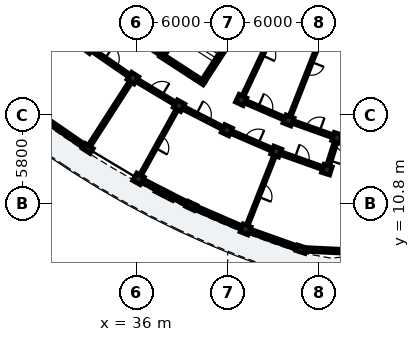
"""IFC4 building model, lengths in metres.
Left out: names, types, materials, properties, quantities, classifications, styles, units other than length and angle.
Written with IfcOpenShell. Run it as: python <this file> out.ifc"""

import sys

from ifc_helpers import new_model, si_unit, direction, frame, frame_2d, origin, origin_2d, place, context, subcontext, project, spatial, rectangle, extrude, element, fill, save


model = new_model("IFC4")
c1 = context("Model", 3, precision=1e-05, world=origin(), true_north=direction((0.0, 1.0)))
c2 = subcontext(c1, "Body", "Model", "MODEL_VIEW")
j1 = project(units=[si_unit("LENGTHUNIT", "METRE"), si_unit("PLANEANGLEUNIT", "RADIAN")], contexts=[c1])
p1 = place(None, origin())
s1 = spatial("IfcSite", under=j1, at=p1, CompositionType="ELEMENT")
p2 = place(p1, origin())
s2 = spatial("IfcBuilding", under=s1, at=p2, CompositionType="ELEMENT")
p3 = place(p2, frame((0.0, 0.0, 22.28)))
s3 = spatial("IfcBuildingStorey", under=s2, at=p3, CompositionType="ELEMENT", Elevation=22.28)
p4 = place(p3, frame((40.413, 18.882, 0.0), z_axis=(0.0, 0.0, 1.0), x_axis=(0.544629435258, 0.838676802022, 0.0)))
e1 = element("IfcWall", 1, at=p4, inside=s3, PredefinedType="SHEAR", context=c2, shape_type="SweptSolid", body=[
    extrude(rectangle(XDim=6.6, YDim=0.25, at=frame_2d((3.3, 0.0))), origin(), (0.0, 0.0, 1.0), 3.11),
])
p5 = place(p3, frame((40.449, 18.709, 0.0), z_axis=(0.0, 0.0, 1.0), x_axis=(-0.838678407117, 0.544626963559, 0.0)))
e2 = element("IfcWall", 2, at=p5, inside=s3, PredefinedType="SHEAR", context=c2, shape_type="SweptSolid", body=[
    extrude(rectangle(XDim=3.42, YDim=0.25, at=frame_2d((1.71, 0.0))), origin(), (0.0, 0.0, 1.0), 3.11),
])
p6 = place(p3, frame((37.754, 20.608, 0.0), z_axis=(0.0, 0.0, 1.0), x_axis=(0.544655453679, 0.838659905312, 0.0)))
e3 = element("IfcWall", 3, at=p6, inside=s3, PredefinedType="SHEAR", context=c2, shape_type="SweptSolid", body=[
    extrude(rectangle(XDim=6.6, YDim=0.25, at=frame_2d((3.3, 0.0))), origin(), (0.0, 0.0, 1.0), 3.11),
])
p7 = place(p6, frame((0.22, 0.0, 0.0)))
e4 = element("IfcOpeningElement", 4, at=p7, cuts=e3, PredefinedType="OPENING", context=c2, shape_type="SweptSolid", body=[
    extrude(rectangle(XDim=1.05, YDim=2.15, at=frame_2d((0.525, 1.075))), frame((0.0, 0.135, 0.0), z_axis=(0.0, -1.0, 0.0), x_axis=(1.0, 0.0, 0.0)), (0.0, 0.0, 1.0), 0.27),
])
for number, where, z_axis, x_axis in (
    (5, (32.85, 21.052, 0.0), (0.0, 0.0, 1.0), (-0.595, -0.804, 0.0)),
    (6, (35.76, 19.042, 0.0), (0.0, 0.0, 1.0), (-0.541, -0.841, 0.0)),
):
    element("IfcColumn", number, at=place(p3, frame(where, z_axis=z_axis, x_axis=x_axis)), inside=s3, PredefinedType="COLUMN", context=c2, shape_type="SweptSolid", body=[
        extrude(rectangle(XDim=0.56, YDim=0.56, at=origin_2d()), origin(), (0.0, 0.0, 1.0), 3.11),
    ])
p8 = place(p3, frame((32.785, 14.416, 0.0), z_axis=(0.0, 0.0, 1.0), x_axis=(-0.540974471368, -0.841039012964, 0.0)))
e7 = element("IfcColumn", 7, at=p8, inside=s3, PredefinedType="PILASTER", context=c2, shape_type="SweptSolid", body=[
    extrude(rectangle(XDim=0.38, YDim=0.62, at=origin_2d()), origin(), (0.0, 0.0, 1.0), 3.11),
])
for number, where, z_axis, x_axis in (
    (8, (38.796, 17.227, 0.0), (0.0, 0.0, 1.0), (-0.485, -0.875, 0.0)),
    (9, (36.13, 12.417, 0.0), (0.0, 0.0, 1.0), (-0.485, -0.875, 0.0)),
    (10, (42.882, 17.604, 0.0), (0.0, 0.0, 1.0), (-0.427, -0.904, 0.0)),
    (11, (41.944, 15.614, 0.0), (0.0, 0.0, 1.0), (-0.427, -0.904, 0.0)),
):
    element("IfcColumn", number, at=place(p3, frame(where, z_axis=z_axis, x_axis=x_axis)), inside=s3, PredefinedType="COLUMN", context=c2, shape_type="SweptSolid", body=[
        extrude(rectangle(XDim=0.56, YDim=0.56, at=origin_2d()), origin(), (0.0, 0.0, 1.0), 3.11),
    ])
p9 = place(p3, frame((39.598, 10.64, 0.0), z_axis=(0.0, 0.0, 1.0), x_axis=(-0.426568739901, -0.904455145454, 0.0)))
e12 = element("IfcColumn", 12, at=p9, inside=s3, PredefinedType="PILASTER", context=c2, shape_type="SweptSolid", body=[
    extrude(rectangle(XDim=0.38, YDim=0.62, at=origin_2d()), origin(), (0.0, 0.0, 1.0), 3.11),
])
for number, where, z_axis, x_axis in (
    (13, (45.997, 16.258, 0.0), (0.0, 0.0, 1.0), (-0.367, -0.93, 0.0)),
    (14, (45.191, 14.211, 0.0), (0.0, 0.0, 1.0), (-0.367, -0.93, 0.0)),
    (15, (43.175, 9.094, 0.0), (0.0, 0.0, 1.0), (-0.367, -0.93, 0.0)),
    (16, (49.193, 15.118, 0.0), (0.0, 0.0, 1.0), (-0.305, -0.952, 0.0)),
    (17, (48.522, 13.023, 0.0), (0.0, 0.0, 1.0), (-0.305, -0.952, 0.0)),
):
    element("IfcColumn", number, at=place(p3, frame(where, z_axis=z_axis, x_axis=x_axis)), inside=s3, PredefinedType="COLUMN", context=c2, shape_type="SweptSolid", body=[
        extrude(rectangle(XDim=0.56, YDim=0.56, at=origin_2d()), origin(), (0.0, 0.0, 1.0), 3.11),
    ])
p10 = place(p3, frame((46.845, 7.785, 0.0), z_axis=(0.0, 0.0, 1.0), x_axis=(-0.304864299028, -0.952395799643, 0.0)))
e18 = element("IfcColumn", 18, at=p10, inside=s3, PredefinedType="PILASTER", context=c2, shape_type="SweptSolid", body=[
    extrude(rectangle(XDim=0.38, YDim=0.62, at=origin_2d()), origin(), (0.0, 0.0, 1.0), 3.11),
])
p11 = place(p3, frame((29.784, 16.488, 0.0), z_axis=(0.0, 0.0, 1.0), x_axis=(0.822902356734, -0.568182815017, 0.0)))
e19 = element("IfcWall", 19, at=p11, inside=s3, PredefinedType="SOLIDWALL", context=c2, shape_type="SweptSolid", body=[
    extrude(rectangle(XDim=3.487, YDim=0.245, at=frame_2d((1.743, 0.0))), origin(), (0.0, 0.0, 1.0), 2.355),
])
p12 = place(p11, frame((0.918, 0.0, 0.35)))
e20 = element("IfcOpeningElement", 20, at=p12, cuts=e19, PredefinedType="OPENING", context=c2, shape_type="SweptSolid", body=[
    extrude(rectangle(XDim=1.65, YDim=1.8, at=frame_2d((0.825, 0.9))), frame((0.0, 0.133, 0.0), z_axis=(0.0, -1.0, 0.0), x_axis=(1.0, 0.0, 0.0)), (0.0, 0.0, 1.0), 0.265),
])
p13 = place(p3, frame((36.352, 12.302, 0.0), z_axis=(0.0, 0.0, 1.0), x_axis=(0.890001092753, -0.45595839163, 0.0)))
e21 = element("IfcWall", 21, at=p13, inside=s3, PredefinedType="SOLIDWALL", context=c2, shape_type="SweptSolid", body=[
    extrude(rectangle(XDim=3.487, YDim=0.245, at=frame_2d((1.743, 0.0))), origin(), (0.0, 0.0, 1.0), 2.355),
])
p14 = place(p13, frame((1.104, 0.0, 0.55)))
e22 = element("IfcOpeningElement", 22, at=p14, cuts=e21, PredefinedType="OPENING", context=c2, shape_type="SweptSolid", body=[
    extrude(rectangle(XDim=1.28, YDim=1.52, at=frame_2d((0.64, 0.76))), frame((0.0, 0.133, 0.0), z_axis=(0.0, -1.0, 0.0), x_axis=(1.0, 0.0, 0.0)), (0.0, 0.0, 1.0), 0.265),
])
p15 = place(p3, frame((39.745, 10.576, 0.0), z_axis=(0.0, 0.0, 1.0), x_axis=(0.917938367037, -0.396723019652, 0.0)))
e23 = element("IfcWall", 23, at=p15, inside=s3, PredefinedType="SOLIDWALL", context=c2, shape_type="SweptSolid", body=[
    extrude(rectangle(XDim=3.487, YDim=0.245, at=frame_2d((1.743, 0.0))), origin(), (0.0, 0.0, 1.0), 2.355),
])
p16 = place(p15, frame((0.953, 0.0, 0.35)))
e24 = element("IfcOpeningElement", 24, at=p16, cuts=e23, PredefinedType="OPENING", context=c2, shape_type="SweptSolid", body=[
    extrude(rectangle(XDim=1.58, YDim=1.68, at=frame_2d((0.79, 0.84))), frame((0.0, 0.133, 0.0), z_axis=(0.0, -1.0, 0.0), x_axis=(1.0, 0.0, 0.0)), (0.0, 0.0, 1.0), 0.265),
])
p17 = place(p3, frame((43.41, 9.01, 0.0), z_axis=(0.0, 0.0, 1.0), x_axis=(0.941903386561, -0.335883923976, 0.0)))
e25 = element("IfcWall", 25, at=p17, inside=s3, PredefinedType="SOLIDWALL", context=c2, shape_type="SweptSolid", body=[
    extrude(rectangle(XDim=3.487, YDim=0.245, at=frame_2d((1.743, 0.0))), origin(), (0.0, 0.0, 1.0), 2.355),
])
p18 = place(p17, frame((1.123, 0.0, 0.55)))
e26 = element("IfcOpeningElement", 26, at=p18, cuts=e25, PredefinedType="OPENING", context=c2, shape_type="SweptSolid", body=[
    extrude(rectangle(XDim=1.24, YDim=1.535, at=frame_2d((0.62, 0.768))), frame((0.0, 0.133, 0.0), z_axis=(0.0, -1.0, 0.0), x_axis=(1.0, 0.0, 0.0)), (0.0, 0.0, 1.0), 0.265),
])
p19 = place(p3, frame((50.749, 7.597, 0.0), z_axis=(0.0, 0.0, 1.0), x_axis=(-0.998848550461, 0.047974714619, 0.0)))
e27 = element("IfcWall", 27, at=p19, inside=s3, PredefinedType="SOLIDWALL", context=c2, shape_type="SweptSolid", body=[
    extrude(rectangle(XDim=3.908, YDim=0.245, at=frame_2d((1.954, 0.0))), origin(), (0.0, 0.0, 1.0), 2.355),
])
p20 = place(p19, frame((0.979, 0.0, 0.4)))
e28 = element("IfcOpeningElement", 28, at=p20, cuts=e27, PredefinedType="OPENING", context=c2, shape_type="SweptSolid", body=[
    extrude(rectangle(XDim=1.95, YDim=1.78, at=frame_2d((0.975, 0.89))), frame((0.0, 0.133, 0.0), z_axis=(0.0, -1.0, 0.0), x_axis=(1.0, 0.0, 0.0)), (0.0, 0.0, 1.0), 0.265),
])
p21 = place(p3, frame((37.639, 20.623, 0.0), z_axis=(0.0, 0.0, 1.0), x_axis=(-0.838681446513, 0.544622283124, 0.0)))
e29 = element("IfcWall", 29, at=p21, inside=s3, PredefinedType="PARTITIONING", context=c2, shape_type="SweptSolid", body=[
    extrude(rectangle(XDim=4.9, YDim=0.22, at=frame_2d((2.45, 0.0))), origin(), (0.0, 0.0, 1.0), 2.34),
])
p22 = place(p21, frame((1.95, 0.0, 0.0)))
e30 = element("IfcOpeningElement", 30, at=p22, cuts=e29, PredefinedType="OPENING", context=c2, shape_type="SweptSolid", body=[
    extrude(rectangle(XDim=0.98, YDim=2.14, at=frame_2d((0.49, 1.07))), frame((0.0, 0.12, 0.0), z_axis=(0.0, -1.0, 0.0), x_axis=(1.0, 0.0, 0.0)), (0.0, 0.0, 1.0), 0.24),
])
p23 = place(p3, frame((33.138, 20.853, 0.0), z_axis=(0.0, 0.0, 1.0), x_axis=(0.822870075235, -0.568229565653, 0.0)))
e31 = element("IfcWall", 31, at=p23, inside=s3, PredefinedType="PARTITIONING", context=c2, shape_type="SweptSolid", body=[
    extrude(rectangle(XDim=2.837, YDim=0.195, at=frame_2d((1.418, 0.0))), origin(), (0.0, 0.0, 1.0), 2.37),
])
p24 = place(p23, frame((0.944, 0.0, 0.0)))
e32 = element("IfcOpeningElement", 32, at=p24, cuts=e31, PredefinedType="OPENING", context=c2, shape_type="SweptSolid", body=[
    extrude(rectangle(XDim=0.95, YDim=2.13, at=frame_2d((0.475, 1.065))), frame((0.0, 0.107, 0.0), z_axis=(0.0, -1.0, 0.0), x_axis=(1.0, 0.0, 0.0)), (0.0, 0.0, 1.0), 0.215),
])
p25 = place(p3, frame((35.544, 18.705, 0.0), z_axis=(0.0, 0.0, 1.0), x_axis=(-0.540959731567, -0.84104849374, 0.0)))
e33 = element("IfcWall", 33, at=p25, inside=s3, PredefinedType="PARTITIONING", context=c2, shape_type="SweptSolid", body=[
    extrude(rectangle(XDim=4.7, YDim=0.175, at=frame_2d((2.35, 0.0))), origin(), (0.0, 0.0, 1.0), 2.37),
])
p26 = place(p3, frame((36.061, 18.862, 0.0), z_axis=(0.0, 0.0, 1.0), x_axis=(0.858281647443, -0.51317892948, 0.0)))
e34 = element("IfcWall", 34, at=p26, inside=s3, PredefinedType="PARTITIONING", context=c2, shape_type="SweptSolid", body=[
    extrude(rectangle(XDim=2.837, YDim=0.195, at=frame_2d((1.418, 0.0))), origin(), (0.0, 0.0, 1.0), 2.37),
])
p27 = place(p26, frame((0.954, 0.0, 0.0)))
e35 = element("IfcOpeningElement", 35, at=p27, cuts=e34, PredefinedType="OPENING", context=c2, shape_type="SweptSolid", body=[
    extrude(rectangle(XDim=0.93, YDim=2.12, at=frame_2d((0.465, 1.06))), frame((0.0, 0.107, 0.0), z_axis=(0.0, -1.0, 0.0), x_axis=(1.0, 0.0, 0.0)), (0.0, 0.0, 1.0), 0.215),
])
p28 = place(p3, frame((38.602, 16.877, 0.0), z_axis=(0.0, 0.0, 1.0), x_axis=(-0.484813534336, -0.874617537513, 0.0)))
e36 = element("IfcWall", 36, at=p28, inside=s3, PredefinedType="PARTITIONING", context=c2, shape_type="SweptSolid", body=[
    extrude(rectangle(XDim=4.7, YDim=0.125, at=frame_2d((2.35, 0.0))), origin(), (0.0, 0.0, 1.0), 2.37),
])
p29 = place(p28, frame((1.915, 0.0, 0.0)))
e37 = element("IfcOpeningElement", 37, at=p29, cuts=e36, PredefinedType="OPENING", context=c2, shape_type="SweptSolid", body=[
    extrude(rectangle(XDim=0.87, YDim=2.08, at=frame_2d((0.435, 1.04))), frame((0.0, 0.073, 0.0), z_axis=(0.0, -1.0, 0.0), x_axis=(1.0, 0.0, 0.0)), (0.0, 0.0, 1.0), 0.145),
])
p30 = place(p3, frame((39.107, 17.067, 0.0), z_axis=(0.0, 0.0, 1.0), x_axis=(0.890030590607, -0.45590080915, 0.0)))
e38 = element("IfcWall", 38, at=p30, inside=s3, PredefinedType="PARTITIONING", context=c2, shape_type="SweptSolid", body=[
    extrude(rectangle(XDim=2.837, YDim=0.195, at=frame_2d((1.418, 0.0))), origin(), (0.0, 0.0, 1.0), 2.37),
])
p31 = place(p30, frame((0.924, 0.0, 0.0)))
e39 = element("IfcOpeningElement", 39, at=p31, cuts=e38, PredefinedType="OPENING", context=c2, shape_type="SweptSolid", body=[
    extrude(rectangle(XDim=0.99, YDim=2.16, at=frame_2d((0.495, 1.08))), frame((0.0, 0.107, 0.0), z_axis=(0.0, -1.0, 0.0), x_axis=(1.0, 0.0, 0.0)), (0.0, 0.0, 1.0), 0.215),
])
p32 = place(p3, frame((45.868, 23.935, 0.0), z_axis=(0.0, 0.0, 1.0), x_axis=(-0.426573573579, -0.904452865728, 0.0)))
e40 = element("IfcWall", 40, at=p32, inside=s3, PredefinedType="PARTITIONING", context=c2, shape_type="SweptSolid", body=[
    extrude(rectangle(XDim=6.6, YDim=0.125, at=frame_2d((3.3, 0.0))), origin(), (0.0, 0.0, 1.0), 2.37),
])
p33 = place(p32, frame((2.855, 0.0, 0.0)))
e41 = element("IfcOpeningElement", 41, at=p33, cuts=e40, PredefinedType="OPENING", context=c2, shape_type="SweptSolid", body=[
    extrude(rectangle(XDim=0.89, YDim=2.1, at=frame_2d((0.445, 1.05))), frame((0.0, 0.073, 0.0), z_axis=(0.0, -1.0, 0.0), x_axis=(1.0, 0.0, 0.0)), (0.0, 0.0, 1.0), 0.145),
])
p34 = place(p3, frame((42.265, 15.475, 0.0), z_axis=(0.0, 0.0, 1.0), x_axis=(0.917943439406, -0.396711282991, 0.0)))
e42 = element("IfcWall", 42, at=p34, inside=s3, PredefinedType="PARTITIONING", context=c2, shape_type="SweptSolid", body=[
    extrude(rectangle(XDim=2.837, YDim=0.195, at=frame_2d((1.418, 0.0))), origin(), (0.0, 0.0, 1.0), 2.37),
])
p35 = place(p34, frame((0.934, 0.0, 0.0)))
e43 = element("IfcOpeningElement", 43, at=p35, cuts=e42, PredefinedType="OPENING", context=c2, shape_type="SweptSolid", body=[
    extrude(rectangle(XDim=0.97, YDim=2.15, at=frame_2d((0.485, 1.075))), frame((0.0, 0.107, 0.0), z_axis=(0.0, -1.0, 0.0), x_axis=(1.0, 0.0, 0.0)), (0.0, 0.0, 1.0), 0.215),
])
p36 = place(p3, frame((43.204, 17.465, 0.0), z_axis=(0.0, 0.0, 1.0), x_axis=(0.91793557165, -0.39672948756, 0.0)))
e44 = element("IfcWall", 44, at=p36, inside=s3, PredefinedType="PARTITIONING", context=c2, shape_type="SweptSolid", body=[
    extrude(rectangle(XDim=2.693, YDim=0.195, at=frame_2d((1.346, 0.0))), origin(), (0.0, 0.0, 1.0), 2.37),
])
p37 = place(p36, frame((0.862, 0.0, 0.0)))
e45 = element("IfcOpeningElement", 45, at=p37, cuts=e44, PredefinedType="OPENING", context=c2, shape_type="SweptSolid", body=[
    extrude(rectangle(XDim=0.97, YDim=2.15, at=frame_2d((0.485, 1.075))), frame((0.0, 0.107, 0.0), z_axis=(0.0, -1.0, 0.0), x_axis=(1.0, 0.0, 0.0)), (0.0, 0.0, 1.0), 0.215),
])
p38 = place(p3, frame((45.044, 13.839, 0.0), z_axis=(0.0, 0.0, 1.0), x_axis=(-0.366468650514, -0.930430399434, 0.0)))
e46 = element("IfcWall", 46, at=p38, inside=s3, PredefinedType="PARTITIONING", context=c2, shape_type="SweptSolid", body=[
    extrude(rectangle(XDim=4.7, YDim=0.125, at=frame_2d((2.35, 0.0))), origin(), (0.0, 0.0, 1.0), 2.37),
])
p39 = place(p38, frame((1.905, 0.0, 0.0)))
e47 = element("IfcOpeningElement", 47, at=p39, cuts=e46, PredefinedType="OPENING", context=c2, shape_type="SweptSolid", body=[
    extrude(rectangle(XDim=0.89, YDim=2.1, at=frame_2d((0.445, 1.05))), frame((0.0, 0.073, 0.0), z_axis=(0.0, -1.0, 0.0), x_axis=(1.0, 0.0, 0.0)), (0.0, 0.0, 1.0), 0.145),
])
p40 = place(p3, frame((48.562, 22.771, 0.0), z_axis=(0.0, 0.0, 1.0), x_axis=(-0.366512873936, -0.930412979939, 0.0)))
e48 = element("IfcWall", 48, at=p40, inside=s3, PredefinedType="PARTITIONING", context=c2, shape_type="SweptSolid", body=[
    extrude(rectangle(XDim=6.6, YDim=0.125, at=frame_2d((3.3, 0.0))), origin(), (0.0, 0.0, 1.0), 2.37),
])
p41 = place(p40, frame((2.865, 0.0, 0.0)))
e49 = element("IfcOpeningElement", 49, at=p41, cuts=e48, PredefinedType="OPENING", context=c2, shape_type="SweptSolid", body=[
    extrude(rectangle(XDim=0.87, YDim=2.08, at=frame_2d((0.435, 1.04))), frame((0.0, 0.073, 0.0), z_axis=(0.0, -1.0, 0.0), x_axis=(1.0, 0.0, 0.0)), (0.0, 0.0, 1.0), 0.145),
])
p42 = place(p3, frame((45.52, 14.093, 0.0), z_axis=(0.0, 0.0, 1.0), x_axis=(0.941930628611, -0.335807520589, 0.0)))
e50 = element("IfcWall", 50, at=p42, inside=s3, PredefinedType="PARTITIONING", context=c2, shape_type="SweptSolid", body=[
    extrude(rectangle(XDim=2.837, YDim=0.195, at=frame_2d((1.418, 0.0))), origin(), (0.0, 0.0, 1.0), 2.37),
])
p43 = place(p42, frame((0.944, 0.0, 0.0)))
e51 = element("IfcOpeningElement", 51, at=p43, cuts=e50, PredefinedType="OPENING", context=c2, shape_type="SweptSolid", body=[
    extrude(rectangle(XDim=0.95, YDim=2.13, at=frame_2d((0.475, 1.065))), frame((0.0, 0.107, 0.0), z_axis=(0.0, -1.0, 0.0), x_axis=(1.0, 0.0, 0.0)), (0.0, 0.0, 1.0), 0.215),
])
p44 = place(p3, frame((46.327, 16.14, 0.0), z_axis=(0.0, 0.0, 1.0), x_axis=(0.941895652647, -0.335905611036, 0.0)))
e52 = element("IfcWall", 52, at=p44, inside=s3, PredefinedType="PARTITIONING", context=c2, shape_type="SweptSolid", body=[
    extrude(rectangle(XDim=2.693, YDim=0.195, at=frame_2d((1.346, 0.0))), origin(), (0.0, 0.0, 1.0), 2.37),
])
p45 = place(p44, frame((0.872, 0.0, 0.0)))
e53 = element("IfcOpeningElement", 53, at=p45, cuts=e52, PredefinedType="OPENING", context=c2, shape_type="SweptSolid", body=[
    extrude(rectangle(XDim=0.95, YDim=2.13, at=frame_2d((0.475, 1.065))), frame((0.0, 0.107, 0.0), z_axis=(0.0, -1.0, 0.0), x_axis=(1.0, 0.0, 0.0)), (0.0, 0.0, 1.0), 0.215),
])
p46 = place(p3, frame((49.177, 15.071, 0.0), z_axis=(0.0, 0.0, 1.0), x_axis=(-0.304834784779, -0.952405246725, 0.0)))
e54 = element("IfcWall", 54, at=p46, inside=s3, PredefinedType="PARTITIONING", context=c2, shape_type="SweptSolid", body=[
    extrude(rectangle(XDim=2.1, YDim=0.195, at=frame_2d((1.05, 0.0))), origin(), (0.0, 0.0, 1.0), 2.37),
])
p47 = place(p46, frame((0.57, 0.0, 0.0)))
e55 = element("IfcOpeningElement", 55, at=p47, cuts=e54, PredefinedType="OPENING", context=c2, shape_type="SweptSolid", body=[
    extrude(rectangle(XDim=0.95, YDim=2.13, at=frame_2d((0.475, 1.065))), frame((0.0, 0.107, 0.0), z_axis=(0.0, -1.0, 0.0), x_axis=(1.0, 0.0, 0.0)), (0.0, 0.0, 1.0), 0.215),
])
p48 = place(p12, origin())
e56 = element("IfcWindow", 56, at=p48, inside=s3, PartitioningType="SINGLE_PANEL", PredefinedType="WINDOW", context=c2, shape_type="SweptSolid", body=[
    extrude(rectangle(XDim=1.65, YDim=1.8, at=frame_2d((0.825, 0.9))), frame((0.0, 0.03, 0.0), z_axis=(0.0, -1.0, 0.0), x_axis=(1.0, 0.0, 0.0)), (0.0, 0.0, 1.0), 0.06),
])
fill(e20, e56)
p49 = place(p14, origin())
e57 = element("IfcWindow", 57, at=p49, inside=s3, PartitioningType="SINGLE_PANEL", PredefinedType="WINDOW", context=c2, shape_type="SweptSolid", body=[
    extrude(rectangle(XDim=1.28, YDim=1.52, at=frame_2d((0.64, 0.76))), frame((0.0, 0.03, 0.0), z_axis=(0.0, -1.0, 0.0), x_axis=(1.0, 0.0, 0.0)), (0.0, 0.0, 1.0), 0.06),
])
fill(e22, e57)
p50 = place(p16, origin())
e58 = element("IfcWindow", 58, at=p50, inside=s3, PartitioningType="SINGLE_PANEL", PredefinedType="WINDOW", context=c2, shape_type="SweptSolid", body=[
    extrude(rectangle(XDim=1.58, YDim=1.68, at=frame_2d((0.79, 0.84))), frame((0.0, 0.03, 0.0), z_axis=(0.0, -1.0, 0.0), x_axis=(1.0, 0.0, 0.0)), (0.0, 0.0, 1.0), 0.06),
])
fill(e24, e58)
p51 = place(p18, origin())
e59 = element("IfcWindow", 59, at=p51, inside=s3, PartitioningType="SINGLE_PANEL", PredefinedType="WINDOW", context=c2, shape_type="SweptSolid", body=[
    extrude(rectangle(XDim=1.24, YDim=1.535, at=frame_2d((0.62, 0.768))), frame((0.0, 0.03, 0.0), z_axis=(0.0, -1.0, 0.0), x_axis=(1.0, 0.0, 0.0)), (0.0, 0.0, 1.0), 0.06),
])
fill(e26, e59)
p52 = place(p20, origin())
e60 = element("IfcWindow", 60, at=p52, inside=s3, PartitioningType="SINGLE_PANEL", PredefinedType="WINDOW", context=c2, shape_type="SweptSolid", body=[
    extrude(rectangle(XDim=1.95, YDim=1.78, at=frame_2d((0.975, 0.89))), frame((0.0, 0.03, 0.0), z_axis=(0.0, -1.0, 0.0), x_axis=(1.0, 0.0, 0.0)), (0.0, 0.0, 1.0), 0.06),
])
fill(e28, e60)
p53 = place(p24, origin())
e61 = element("IfcDoor", 61, at=p53, inside=s3, OperationType="SINGLE_SWING_LEFT", PredefinedType="DOOR", context=c2, shape_type="SweptSolid", body=[
    extrude(rectangle(XDim=0.95, YDim=2.13, at=frame_2d((0.475, 1.065))), frame((0.0, 0.025, 0.0), z_axis=(0.0, -1.0, 0.0), x_axis=(1.0, 0.0, 0.0)), (0.0, 0.0, 1.0), 0.05),
])
fill(e32, e61)
p54 = place(p27, origin())
e62 = element("IfcDoor", 62, at=p54, inside=s3, OperationType="SINGLE_SWING_RIGHT", PredefinedType="DOOR", context=c2, shape_type="SweptSolid", body=[
    extrude(rectangle(XDim=0.93, YDim=2.12, at=frame_2d((0.465, 1.06))), frame((0.0, 0.025, 0.0), z_axis=(0.0, -1.0, 0.0), x_axis=(1.0, 0.0, 0.0)), (0.0, 0.0, 1.0), 0.05),
])
fill(e35, e62)
p55 = place(p29, origin())
e63 = element("IfcDoor", 63, at=p55, inside=s3, OperationType="SINGLE_SWING_RIGHT", PredefinedType="DOOR", context=c2, shape_type="SweptSolid", body=[
    extrude(rectangle(XDim=0.87, YDim=2.08, at=frame_2d((0.435, 1.04))), frame((0.0, 0.025, 0.0), z_axis=(0.0, -1.0, 0.0), x_axis=(1.0, 0.0, 0.0)), (0.0, 0.0, 1.0), 0.05),
])
fill(e37, e63)
p56 = place(p31, origin())
e64 = element("IfcDoor", 64, at=p56, inside=s3, OperationType="SINGLE_SWING_LEFT", PredefinedType="DOOR", context=c2, shape_type="SweptSolid", body=[
    extrude(rectangle(XDim=0.99, YDim=2.16, at=frame_2d((0.495, 1.08))), frame((0.0, 0.025, 0.0), z_axis=(0.0, -1.0, 0.0), x_axis=(1.0, 0.0, 0.0)), (0.0, 0.0, 1.0), 0.05),
])
fill(e39, e64)
p57 = place(p33, origin())
e65 = element("IfcDoor", 65, at=p57, inside=s3, OperationType="SINGLE_SWING_RIGHT", PredefinedType="DOOR", context=c2, shape_type="SweptSolid", body=[
    extrude(rectangle(XDim=0.89, YDim=2.1, at=frame_2d((0.445, 1.05))), frame((0.0, 0.025, 0.0), z_axis=(0.0, -1.0, 0.0), x_axis=(1.0, 0.0, 0.0)), (0.0, 0.0, 1.0), 0.05),
])
fill(e41, e65)
p58 = place(p35, origin())
e66 = element("IfcDoor", 66, at=p58, inside=s3, OperationType="SINGLE_SWING_RIGHT", PredefinedType="DOOR", context=c2, shape_type="SweptSolid", body=[
    extrude(rectangle(XDim=0.97, YDim=2.15, at=frame_2d((0.485, 1.075))), frame((0.0, 0.025, 0.0), z_axis=(0.0, -1.0, 0.0), x_axis=(1.0, 0.0, 0.0)), (0.0, 0.0, 1.0), 0.05),
])
fill(e43, e66)
p59 = place(p37, origin())
e67 = element("IfcDoor", 67, at=p59, inside=s3, OperationType="SINGLE_SWING_LEFT", PredefinedType="DOOR", context=c2, shape_type="SweptSolid", body=[
    extrude(rectangle(XDim=0.97, YDim=2.15, at=frame_2d((0.485, 1.075))), frame((0.0, 0.025, 0.0), z_axis=(0.0, -1.0, 0.0), x_axis=(1.0, 0.0, 0.0)), (0.0, 0.0, 1.0), 0.05),
])
fill(e45, e67)
p60 = place(p39, origin())
e68 = element("IfcDoor", 68, at=p60, inside=s3, OperationType="SINGLE_SWING_RIGHT", PredefinedType="DOOR", context=c2, shape_type="SweptSolid", body=[
    extrude(rectangle(XDim=0.89, YDim=2.1, at=frame_2d((0.445, 1.05))), frame((0.0, 0.025, 0.0), z_axis=(0.0, -1.0, 0.0), x_axis=(1.0, 0.0, 0.0)), (0.0, 0.0, 1.0), 0.05),
])
fill(e47, e68)
p61 = place(p41, origin())
e69 = element("IfcDoor", 69, at=p61, inside=s3, OperationType="SINGLE_SWING_LEFT", PredefinedType="DOOR", context=c2, shape_type="SweptSolid", body=[
    extrude(rectangle(XDim=0.87, YDim=2.08, at=frame_2d((0.435, 1.04))), frame((0.0, 0.025, 0.0), z_axis=(0.0, -1.0, 0.0), x_axis=(1.0, 0.0, 0.0)), (0.0, 0.0, 1.0), 0.05),
])
fill(e49, e69)
p62 = place(p43, origin())
e70 = element("IfcDoor", 70, at=p62, inside=s3, OperationType="SINGLE_SWING_LEFT", PredefinedType="DOOR", context=c2, shape_type="SweptSolid", body=[
    extrude(rectangle(XDim=0.95, YDim=2.13, at=frame_2d((0.475, 1.065))), frame((0.0, 0.025, 0.0), z_axis=(0.0, -1.0, 0.0), x_axis=(1.0, 0.0, 0.0)), (0.0, 0.0, 1.0), 0.05),
])
fill(e51, e70)
p63 = place(p45, origin())
e71 = element("IfcDoor", 71, at=p63, inside=s3, OperationType="SINGLE_SWING_RIGHT", PredefinedType="DOOR", context=c2, shape_type="SweptSolid", body=[
    extrude(rectangle(XDim=0.95, YDim=2.13, at=frame_2d((0.475, 1.065))), frame((0.0, 0.025, 0.0), z_axis=(0.0, -1.0, 0.0), x_axis=(1.0, 0.0, 0.0)), (0.0, 0.0, 1.0), 0.05),
])
fill(e53, e71)
p64 = place(p47, origin())
e72 = element("IfcDoor", 72, at=p64, inside=s3, OperationType="SINGLE_SWING_RIGHT", PredefinedType="DOOR", context=c2, shape_type="SweptSolid", body=[
    extrude(rectangle(XDim=0.95, YDim=2.13, at=frame_2d((0.475, 1.065))), frame((0.0, 0.025, 0.0), z_axis=(0.0, -1.0, 0.0), x_axis=(1.0, 0.0, 0.0)), (0.0, 0.0, 1.0), 0.05),
])
fill(e55, e72)
save(model, sys.argv[1])
